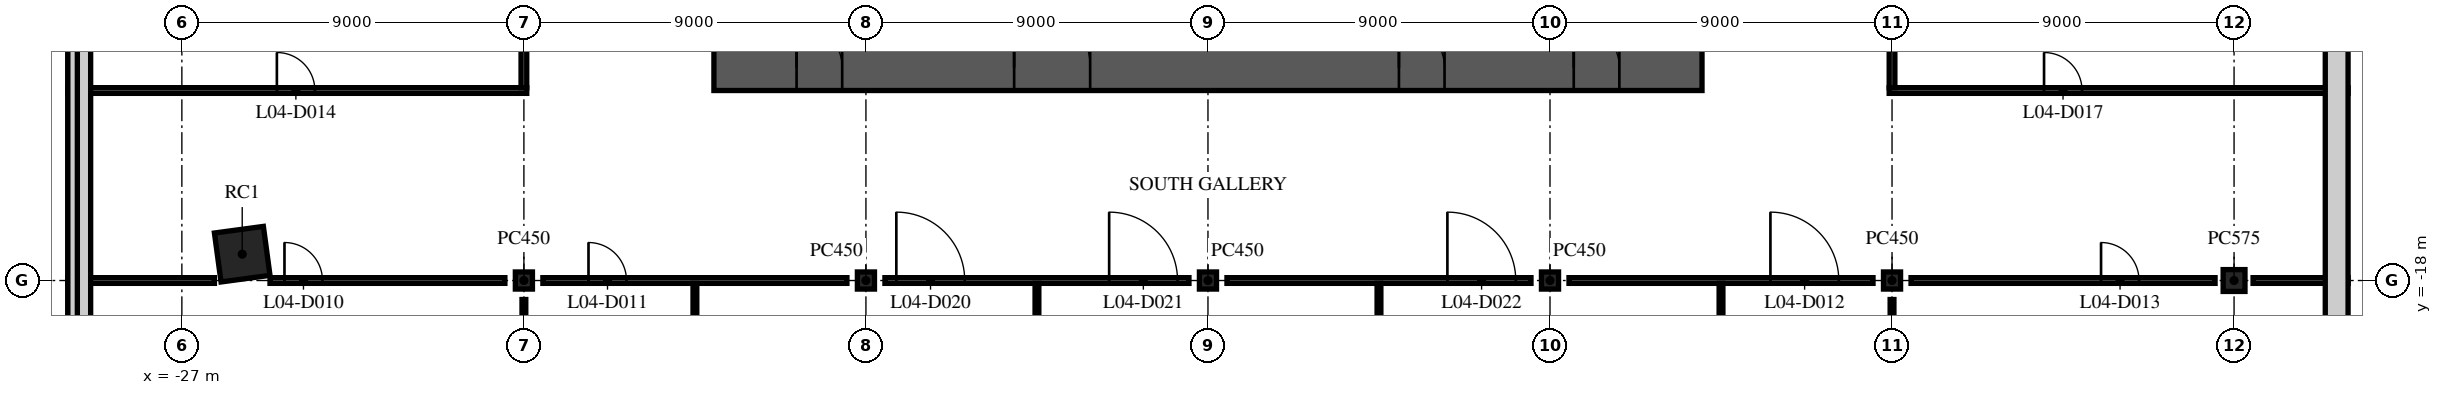
"""IFC4 building model, lengths in metres.
Left out: names, types, materials, properties, quantities, classifications, styles, units other than length and angle.
Written with IfcOpenShell. Run it as: python <this file> out.ifc"""

import sys

from ifc_helpers import new_model, si_unit, direction, frame, frame_2d, origin, origin_2d, place, context, subcontext, project, spatial, rectangle, extrude, element, fill, save


model = new_model("IFC4")
c1 = context("Model", 3, precision=1e-05, world=origin(), true_north=direction((0.0, 1.0)))
c2 = subcontext(c1, "Body", "Model", "MODEL_VIEW")
j1 = project(units=[si_unit("LENGTHUNIT", "METRE"), si_unit("PLANEANGLEUNIT", "RADIAN")], contexts=[c1])
p1 = place(None, origin())
s1 = spatial("IfcSite", under=j1, at=p1, CompositionType="ELEMENT")
p2 = place(p1, origin())
s2 = spatial("IfcBuilding", under=s1, at=p2, CompositionType="ELEMENT")
p3 = place(p2, frame((0.0, 0.0, 18.0)))
s3 = spatial("IfcBuildingStorey", under=s2, at=p3, CompositionType="ELEMENT", Elevation=18.0)
for number, where, z_axis, x_axis in (
    (1, (-18.0, -18.0, 0.0), (0.0, 0.0, 1.0), (1.0, 0.0, 0.0)),
    (2, (-9.0, -18.0, 0.0), (0.0, 0.0, 1.0), (1.0, 0.0, 0.0)),
    (3, (0.0, -18.0, 0.0), (0.0, 0.0, 1.0), (1.0, 0.0, 0.0)),
    (4, (9.0, -18.0, 0.0), (0.0, 0.0, 1.0), (1.0, 0.0, 0.0)),
    (5, (18.0, -18.0, 0.0), (0.0, 0.0, 1.0), (1.0, 0.0, 0.0)),
):
    element("IfcColumn", number, at=place(p3, frame(where, z_axis=z_axis, x_axis=x_axis)), inside=s3, PredefinedType="COLUMN", context=c2, shape_type="SweptSolid", body=[
        extrude(rectangle(XDim=0.45, YDim=0.45, at=origin_2d()), origin(), (0.0, 0.0, 1.0), 4.5),
    ])
p4 = place(p3, frame((27.0, -18.0, 0.0), z_axis=(0.0, 0.0, 1.0), x_axis=(1.0, 0.0, 0.0)))
e6 = element("IfcColumn", 6, at=p4, inside=s3, PredefinedType="COLUMN", context=c2, shape_type="SweptSolid", body=[
    extrude(rectangle(XDim=0.575, YDim=0.575, at=origin_2d()), origin(), (0.0, 0.0, 1.0), 4.5),
])
p5 = place(p3, frame((-25.412, -17.307, 0.0), z_axis=(0.0, 0.0, 1.0), x_axis=(0.991001197216, 0.133853005627, 0.0)))
e7 = element("IfcColumn", 7, at=p5, inside=s3, PredefinedType="COLUMN", context=c2, shape_type="SweptSolid", body=[
    extrude(rectangle(XDim=1.3, YDim=1.3, at=origin_2d()), origin(), (0.0, 0.0, 1.0), 4.5),
])
p6 = place(p3, frame((-13.0, -12.4, 0.0), z_axis=(0.0, 0.0, 1.0), x_axis=(1.0, 0.0, 0.0)))
e8 = element("IfcWall", 8, at=p6, inside=s3, PredefinedType="SHEAR", context=c2, shape_type="SweptSolid", body=[
    extrude(rectangle(XDim=26.0, YDim=1.2, at=frame_2d((13.0, 0.0))), origin(), (0.0, 0.0, 1.0), 4.05),
])
p7 = place(p6, frame((7.9, 0.0, 0.0)))
e9 = element("IfcOpeningElement", 9, at=p7, cuts=e8, PredefinedType="OPENING", context=c2, shape_type="SweptSolid", body=[
    extrude(rectangle(XDim=2.0, YDim=2.1, at=frame_2d((1.0, 1.05))), frame((0.0, 0.61, 0.0), z_axis=(0.0, -1.0, 0.0), x_axis=(1.0, 0.0, 0.0)), (0.0, 0.0, 1.0), 1.22),
])
p8 = place(p6, frame((18.025, 0.0, 0.0)))
e10 = element("IfcOpeningElement", 10, at=p8, cuts=e8, PredefinedType="OPENING", context=c2, shape_type="SweptSolid", body=[
    extrude(rectangle(XDim=1.2, YDim=2.1, at=frame_2d((0.6, 1.05))), frame((0.0, 0.61, 0.0), z_axis=(0.0, -1.0, 0.0), x_axis=(1.0, 0.0, 0.0)), (0.0, 0.0, 1.0), 1.22),
])
p9 = place(p6, frame((2.175, 0.0, 0.0)))
e11 = element("IfcOpeningElement", 11, at=p9, cuts=e8, PredefinedType="OPENING", context=c2, shape_type="SweptSolid", body=[
    extrude(rectangle(XDim=1.2, YDim=2.1, at=frame_2d((0.6, 1.05))), frame((0.0, 0.61, 0.0), z_axis=(0.0, -1.0, 0.0), x_axis=(1.0, 0.0, 0.0)), (0.0, 0.0, 1.0), 1.22),
])
p10 = place(p6, frame((22.625, 0.0, 0.0)))
e12 = element("IfcOpeningElement", 12, at=p10, cuts=e8, PredefinedType="OPENING", context=c2, shape_type="SweptSolid", body=[
    extrude(rectangle(XDim=1.2, YDim=2.1, at=frame_2d((0.6, 1.05))), frame((0.0, 0.61, 0.0), z_axis=(0.0, -1.0, 0.0), x_axis=(1.0, 0.0, 0.0)), (0.0, 0.0, 1.0), 1.22),
])
p11 = place(p3, frame((-30.0, -18.0, 0.0), z_axis=(0.0, 0.0, 1.0), x_axis=(1.0, 0.0, 0.0)))
e13 = element("IfcWall", 13, at=p11, inside=s3, PredefinedType="PARTITIONING", context=c2, shape_type="SweptSolid", body=[
    extrude(rectangle(XDim=3.857, YDim=0.15, at=frame_2d((1.928, 0.0))), origin(), (0.0, 0.0, 1.0), 4.05),
])
p12 = place(p3, frame((-24.681, -18.0, 0.0), z_axis=(0.0, 0.0, 1.0), x_axis=(1.0, 0.0, 0.0)))
e14 = element("IfcWall", 14, at=p12, inside=s3, PredefinedType="PARTITIONING", context=c2, shape_type="SweptSolid", body=[
    extrude(rectangle(XDim=6.181, YDim=0.15, at=frame_2d((3.09, 0.0))), origin(), (0.0, 0.0, 1.0), 3.53),
])
p13 = place(p12, frame((0.381, 0.0, 0.0)))
e15 = element("IfcOpeningElement", 15, at=p13, cuts=e14, PredefinedType="OPENING", context=c2, shape_type="SweptSolid", body=[
    extrude(rectangle(XDim=1.0, YDim=2.1, at=frame_2d((0.5, 1.05))), frame((0.0, 0.085, 0.0), z_axis=(0.0, -1.0, 0.0), x_axis=(1.0, 0.0, 0.0)), (0.0, 0.0, 1.0), 0.17),
])
p14 = place(p3, frame((-17.5, -18.0, 0.0), z_axis=(0.0, 0.0, 1.0), x_axis=(1.0, 0.0, 0.0)))
e16 = element("IfcWall", 16, at=p14, inside=s3, PredefinedType="PARTITIONING", context=c2, shape_type="SweptSolid", body=[
    extrude(rectangle(XDim=8.0, YDim=0.15, at=frame_2d((4.0, 0.0))), origin(), (0.0, 0.0, 1.0), 3.53),
])
p15 = place(p14, frame((1.2, 0.0, 0.0)))
e17 = element("IfcOpeningElement", 17, at=p15, cuts=e16, PredefinedType="OPENING", context=c2, shape_type="SweptSolid", body=[
    extrude(rectangle(XDim=1.0, YDim=2.1, at=frame_2d((0.5, 1.05))), frame((0.0, 0.085, 0.0), z_axis=(0.0, -1.0, 0.0), x_axis=(1.0, 0.0, 0.0)), (0.0, 0.0, 1.0), 0.17),
])
p16 = place(p3, frame((-8.5, -18.0, 0.0), z_axis=(0.0, 0.0, 1.0), x_axis=(1.0, 0.0, 0.0)))
e18 = element("IfcWall", 18, at=p16, inside=s3, PredefinedType="PARTITIONING", context=c2, shape_type="SweptSolid", body=[
    extrude(rectangle(XDim=8.0, YDim=0.15, at=frame_2d((4.0, 0.0))), origin(), (0.0, 0.0, 1.0), 3.53),
])
p17 = place(p16, frame((0.3, 0.0, 0.0)))
e19 = element("IfcOpeningElement", 19, at=p17, cuts=e18, PredefinedType="OPENING", context=c2, shape_type="SweptSolid", body=[
    extrude(rectangle(XDim=1.8, YDim=2.1, at=frame_2d((0.9, 1.05))), frame((0.0, 0.085, 0.0), z_axis=(0.0, -1.0, 0.0), x_axis=(1.0, 0.0, 0.0)), (0.0, 0.0, 1.0), 0.17),
])
p18 = place(p16, frame((5.9, 0.0, 0.0)))
e20 = element("IfcOpeningElement", 20, at=p18, cuts=e18, PredefinedType="OPENING", context=c2, shape_type="SweptSolid", body=[
    extrude(rectangle(XDim=1.8, YDim=2.1, at=frame_2d((0.9, 1.05))), frame((0.0, 0.085, 0.0), z_axis=(0.0, -1.0, 0.0), x_axis=(1.0, 0.0, 0.0)), (0.0, 0.0, 1.0), 0.17),
])
p19 = place(p3, frame((0.5, -18.0, 0.0), z_axis=(0.0, 0.0, 1.0), x_axis=(1.0, 0.0, 0.0)))
e21 = element("IfcWall", 21, at=p19, inside=s3, PredefinedType="PARTITIONING", context=c2, shape_type="SweptSolid", body=[
    extrude(rectangle(XDim=8.0, YDim=0.15, at=frame_2d((4.0, 0.0))), origin(), (0.0, 0.0, 1.0), 3.53),
])
p20 = place(p19, frame((5.8, 0.0, 0.0)))
e22 = element("IfcOpeningElement", 22, at=p20, cuts=e21, PredefinedType="OPENING", context=c2, shape_type="SweptSolid", body=[
    extrude(rectangle(XDim=1.8, YDim=2.1, at=frame_2d((0.9, 1.05))), frame((0.0, 0.085, 0.0), z_axis=(0.0, -1.0, 0.0), x_axis=(1.0, 0.0, 0.0)), (0.0, 0.0, 1.0), 0.17),
])
p21 = place(p3, frame((9.5, -18.0, 0.0), z_axis=(0.0, 0.0, 1.0), x_axis=(1.0, 0.0, 0.0)))
e23 = element("IfcWall", 23, at=p21, inside=s3, PredefinedType="PARTITIONING", context=c2, shape_type="SweptSolid", body=[
    extrude(rectangle(XDim=8.0, YDim=0.15, at=frame_2d((4.0, 0.0))), origin(), (0.0, 0.0, 1.0), 3.53),
])
p22 = place(p21, frame((5.3, 0.0, 0.0)))
e24 = element("IfcOpeningElement", 24, at=p22, cuts=e23, PredefinedType="OPENING", context=c2, shape_type="SweptSolid", body=[
    extrude(rectangle(XDim=1.8, YDim=2.1, at=frame_2d((0.9, 1.05))), frame((0.0, 0.085, 0.0), z_axis=(0.0, -1.0, 0.0), x_axis=(1.0, 0.0, 0.0)), (0.0, 0.0, 1.0), 0.17),
])
p23 = place(p3, frame((18.5, -18.0, 0.0), z_axis=(0.0, 0.0, 1.0), x_axis=(1.0, 0.0, 0.0)))
e25 = element("IfcWall", 25, at=p23, inside=s3, PredefinedType="PARTITIONING", context=c2, shape_type="SweptSolid", body=[
    extrude(rectangle(XDim=8.0, YDim=0.15, at=frame_2d((4.0, 0.0))), origin(), (0.0, 0.0, 1.0), 3.53),
])
p24 = place(p23, frame((5.0, 0.0, 0.0)))
e26 = element("IfcOpeningElement", 26, at=p24, cuts=e25, PredefinedType="OPENING", context=c2, shape_type="SweptSolid", body=[
    extrude(rectangle(XDim=1.0, YDim=2.1, at=frame_2d((0.5, 1.05))), frame((0.0, 0.085, 0.0), z_axis=(0.0, -1.0, 0.0), x_axis=(1.0, 0.0, 0.0)), (0.0, 0.0, 1.0), 0.17),
])
p25 = place(p3, frame((27.5, -18.0, 0.0), z_axis=(0.0, 0.0, 1.0), x_axis=(1.0, 0.0, 0.0)))
e27 = element("IfcWall", 27, at=p25, inside=s3, PredefinedType="PARTITIONING", context=c2, shape_type="SweptSolid", body=[
    extrude(rectangle(XDim=2.5, YDim=0.15, at=frame_2d((1.25, 0.0))), origin(), (0.0, 0.0, 1.0), 3.23),
])
p26 = place(p3, frame((-30.0, -13.0, 0.0), z_axis=(0.0, 0.0, 1.0), x_axis=(1.0, 0.0, 0.0)))
e28 = element("IfcWall", 28, at=p26, inside=s3, PredefinedType="PARTITIONING", context=c2, shape_type="SweptSolid", body=[
    extrude(rectangle(XDim=12.075, YDim=0.15, at=frame_2d((6.038, 0.0))), origin(), (0.0, 0.0, 1.0), 3.23),
])
p27 = place(p26, frame((5.5, 0.0, 0.0)))
e29 = element("IfcOpeningElement", 29, at=p27, cuts=e28, PredefinedType="OPENING", context=c2, shape_type="SweptSolid", body=[
    extrude(rectangle(XDim=1.0, YDim=2.1, at=frame_2d((0.5, 1.05))), frame((0.0, 0.085, 0.0), z_axis=(0.0, -1.0, 0.0), x_axis=(1.0, 0.0, 0.0)), (0.0, 0.0, 1.0), 0.17),
])
p28 = place(p3, frame((17.925, -13.0, 0.0), z_axis=(0.0, 0.0, 1.0), x_axis=(1.0, 0.0, 0.0)))
e30 = element("IfcWall", 30, at=p28, inside=s3, PredefinedType="PARTITIONING", context=c2, shape_type="SweptSolid", body=[
    extrude(rectangle(XDim=12.075, YDim=0.15, at=frame_2d((6.038, 0.0))), origin(), (0.0, 0.0, 1.0), 3.23),
])
p29 = place(p28, frame((4.075, 0.0, 0.0)))
e31 = element("IfcOpeningElement", 31, at=p29, cuts=e30, PredefinedType="OPENING", context=c2, shape_type="SweptSolid", body=[
    extrude(rectangle(XDim=1.0, YDim=2.1, at=frame_2d((0.5, 1.05))), frame((0.0, 0.085, 0.0), z_axis=(0.0, -1.0, 0.0), x_axis=(1.0, 0.0, 0.0)), (0.0, 0.0, 1.0), 0.17),
])
p30 = place(p3, frame((-18.0, -26.5, 0.0), z_axis=(0.0, 0.0, 1.0), x_axis=(0.0, 1.0, 0.0)))
e32 = element("IfcWall", 32, at=p30, inside=s3, PredefinedType="PARTITIONING", context=c2, shape_type="SweptSolid", body=[
    extrude(rectangle(XDim=8.0, YDim=0.1, at=frame_2d((4.0, 0.0))), origin(), (0.0, 0.0, 1.0), 3.53),
])
p31 = place(p3, frame((-18.0, -12.925, 0.0), z_axis=(0.0, 0.0, 1.0), x_axis=(0.0, 1.0, 0.0)))
e33 = element("IfcWall", 33, at=p31, inside=s3, PredefinedType="PARTITIONING", context=c2, shape_type="SweptSolid", body=[
    extrude(rectangle(XDim=3.425, YDim=0.15, at=frame_2d((1.712, 0.0))), origin(), (0.0, 0.0, 1.0), 3.53),
])
for number, where, z_axis, x_axis in (
    (34, (-13.5, -30.0, 0.0), (0.0, 0.0, 1.0), (0.0, 1.0, 0.0)),
    (35, (-4.5, -30.0, 0.0), (0.0, 0.0, 1.0), (0.0, 1.0, 0.0)),
    (36, (4.5, -30.0, 0.0), (0.0, 0.0, 1.0), (0.0, 1.0, 0.0)),
    (37, (13.5, -30.0, 0.0), (0.0, 0.0, 1.0), (0.0, 1.0, 0.0)),
):
    element("IfcWall", number, at=place(p3, frame(where, z_axis=z_axis, x_axis=x_axis)), inside=s3, PredefinedType="PARTITIONING", context=c2, shape_type="SweptSolid", body=[
        extrude(rectangle(XDim=11.925, YDim=0.1, at=frame_2d((5.962, 0.0))), origin(), (0.0, 0.0, 1.0), 3.23),
    ])
p32 = place(p3, frame((18.0, -24.681, 0.0), z_axis=(0.0, 0.0, 1.0), x_axis=(0.0, 1.0, 0.0)))
e38 = element("IfcWall", 38, at=p32, inside=s3, PredefinedType="PARTITIONING", context=c2, shape_type="SweptSolid", body=[
    extrude(rectangle(XDim=6.181, YDim=0.1, at=frame_2d((3.09, 0.0))), origin(), (0.0, 0.0, 1.0), 3.53),
])
p33 = place(p3, frame((18.0, -12.925, 0.0), z_axis=(0.0, 0.0, 1.0), x_axis=(0.0, 1.0, 0.0)))
e39 = element("IfcWall", 39, at=p33, inside=s3, PredefinedType="PARTITIONING", context=c2, shape_type="SweptSolid", body=[
    extrude(rectangle(XDim=3.425, YDim=0.15, at=frame_2d((1.712, 0.0))), origin(), (0.0, 0.0, 1.0), 3.53),
])
p34 = place(p3, frame((29.7, -29.4, 0.0), z_axis=(0.0, 0.0, 1.0), x_axis=(0.0, 1.0, 0.0)))
e40 = element("IfcWall", 40, at=p34, inside=s3, PredefinedType="STANDARD", context=c2, shape_type="SweptSolid", body=[
    extrude(rectangle(XDim=30.25, YDim=0.6, at=frame_2d((15.125, 0.0))), origin(), (0.0, 0.0, 1.0), 4.05),
])
p35 = place(p34, frame((0.908, 0.0, 0.9)))
e41 = element("IfcOpeningElement", 41, at=p35, cuts=e40, PredefinedType="OPENING", context=c2, shape_type="SweptSolid", body=[
    extrude(rectangle(XDim=2.2, YDim=3.0, at=frame_2d((1.1, 1.5))), frame((0.0, 0.31, 0.0), z_axis=(0.0, -1.0, 0.0), x_axis=(1.0, 0.0, 0.0)), (0.0, 0.0, 1.0), 0.62),
])
p36 = place(p34, frame((5.223, 0.0, 0.9)))
e42 = element("IfcOpeningElement", 42, at=p36, cuts=e40, PredefinedType="OPENING", context=c2, shape_type="SweptSolid", body=[
    extrude(rectangle(XDim=2.2, YDim=3.0, at=frame_2d((1.1, 1.5))), frame((0.0, 0.31, 0.0), z_axis=(0.0, -1.0, 0.0), x_axis=(1.0, 0.0, 0.0)), (0.0, 0.0, 1.0), 0.62),
])
p37 = place(p34, frame((23.685, 0.0, 0.9)))
e43 = element("IfcOpeningElement", 43, at=p37, cuts=e40, PredefinedType="OPENING", context=c2, shape_type="SweptSolid", body=[
    extrude(rectangle(XDim=2.2, YDim=3.0, at=frame_2d((1.1, 1.5))), frame((0.0, 0.31, 0.0), z_axis=(0.0, -1.0, 0.0), x_axis=(1.0, 0.0, 0.0)), (0.0, 0.0, 1.0), 0.62),
])
p38 = place(p3, frame((-29.7, -1.4, 0.0), z_axis=(0.0, 0.0, 1.0), x_axis=(0.0, -1.0, 0.0)))
e44 = element("IfcWall", 44, at=p38, inside=s3, PredefinedType="STANDARD", context=c2, shape_type="SweptSolid", body=[
    extrude(rectangle(XDim=28.6, YDim=0.6, at=frame_2d((14.3, 0.0))), origin(), (0.0, 0.0, 1.0), 4.05),
])
p39 = place(p38, frame((6.731, 0.0, 0.9)))
e45 = element("IfcOpeningElement", 45, at=p39, cuts=e44, PredefinedType="OPENING", context=c2, shape_type="SweptSolid", body=[
    extrude(rectangle(XDim=2.2, YDim=3.0, at=frame_2d((1.1, 1.5))), frame((0.0, 0.31, 0.0), z_axis=(0.0, -1.0, 0.0), x_axis=(1.0, 0.0, 0.0)), (0.0, 0.0, 1.0), 0.62),
])
p40 = place(p38, frame((20.577, 0.0, 0.9)))
e46 = element("IfcOpeningElement", 46, at=p40, cuts=e44, PredefinedType="OPENING", context=c2, shape_type="SweptSolid", body=[
    extrude(rectangle(XDim=2.2, YDim=3.0, at=frame_2d((1.1, 1.5))), frame((0.0, 0.31, 0.0), z_axis=(0.0, -1.0, 0.0), x_axis=(1.0, 0.0, 0.0)), (0.0, 0.0, 1.0), 0.62),
])
p41 = place(p38, frame((25.192, 0.0, 0.9)))
e47 = element("IfcOpeningElement", 47, at=p41, cuts=e44, PredefinedType="OPENING", context=c2, shape_type="SweptSolid", body=[
    extrude(rectangle(XDim=2.2, YDim=3.0, at=frame_2d((1.1, 1.5))), frame((0.0, 0.31, 0.0), z_axis=(0.0, -1.0, 0.0), x_axis=(1.0, 0.0, 0.0)), (0.0, 0.0, 1.0), 0.62),
])
p42 = place(p3, frame((-29.875, -7.453, 4.5), z_axis=(0.0, 0.0, 1.0), x_axis=(0.0, -1.0, 0.0)))
e48 = element("IfcWall", 48, at=p42, inside=s3, PredefinedType="PARAPET", context=c2, shape_type="SweptSolid", body=[
    extrude(rectangle(XDim=22.547, YDim=0.25, at=frame_2d((11.273, 0.0))), origin(), (0.0, 0.0, 1.0), 1.1),
])
p43 = place(p7, origin())
e49 = element("IfcDoor", 49, at=p43, inside=s3, OperationType="SINGLE_SWING_LEFT", PredefinedType="DOOR", context=c2, shape_type="SweptSolid", body=[
    extrude(rectangle(XDim=2.0, YDim=2.1, at=frame_2d((1.0, 1.05))), frame((0.0, 0.025, 0.0), z_axis=(0.0, -1.0, 0.0), x_axis=(1.0, 0.0, 0.0)), (0.0, 0.0, 1.0), 0.05),
])
fill(e9, e49)
p44 = place(p8, origin())
e50 = element("IfcDoor", 50, at=p44, inside=s3, OperationType="SINGLE_SWING_LEFT", PredefinedType="DOOR", context=c2, shape_type="SweptSolid", body=[
    extrude(rectangle(XDim=1.2, YDim=2.1, at=frame_2d((0.6, 1.05))), frame((0.0, 0.025, 0.0), z_axis=(0.0, -1.0, 0.0), x_axis=(1.0, 0.0, 0.0)), (0.0, 0.0, 1.0), 0.05),
])
fill(e10, e50)
p45 = place(p9, origin())
e51 = element("IfcDoor", 51, at=p45, inside=s3, OperationType="SINGLE_SWING_LEFT", PredefinedType="DOOR", context=c2, shape_type="SweptSolid", body=[
    extrude(rectangle(XDim=1.2, YDim=2.1, at=frame_2d((0.6, 1.05))), frame((0.0, 0.025, 0.0), z_axis=(0.0, -1.0, 0.0), x_axis=(1.0, 0.0, 0.0)), (0.0, 0.0, 1.0), 0.05),
])
fill(e11, e51)
p46 = place(p10, origin())
e52 = element("IfcDoor", 52, at=p46, inside=s3, OperationType="SINGLE_SWING_LEFT", PredefinedType="DOOR", context=c2, shape_type="SweptSolid", body=[
    extrude(rectangle(XDim=1.2, YDim=2.1, at=frame_2d((0.6, 1.05))), frame((0.0, 0.025, 0.0), z_axis=(0.0, -1.0, 0.0), x_axis=(1.0, 0.0, 0.0)), (0.0, 0.0, 1.0), 0.05),
])
fill(e12, e52)
p47 = place(p13, origin())
e53 = element("IfcDoor", 53, at=p47, inside=s3, OperationType="SINGLE_SWING_RIGHT", PredefinedType="DOOR", context=c2, shape_type="SweptSolid", body=[
    extrude(rectangle(XDim=1.0, YDim=2.1, at=frame_2d((0.5, 1.05))), frame((0.0, 0.025, 0.0), z_axis=(0.0, -1.0, 0.0), x_axis=(1.0, 0.0, 0.0)), (0.0, 0.0, 1.0), 0.05),
])
fill(e15, e53)
p48 = place(p15, origin())
e54 = element("IfcDoor", 54, at=p48, inside=s3, OperationType="SINGLE_SWING_LEFT", PredefinedType="DOOR", context=c2, shape_type="SweptSolid", body=[
    extrude(rectangle(XDim=1.0, YDim=2.1, at=frame_2d((0.5, 1.05))), frame((0.0, 0.025, 0.0), z_axis=(0.0, -1.0, 0.0), x_axis=(1.0, 0.0, 0.0)), (0.0, 0.0, 1.0), 0.05),
])
fill(e17, e54)
p49 = place(p22, origin())
e55 = element("IfcDoor", 55, at=p49, inside=s3, OperationType="DOUBLE_DOOR_SINGLE_SWING", PredefinedType="DOOR", context=c2, shape_type="SweptSolid", body=[
    extrude(rectangle(XDim=1.8, YDim=2.1, at=frame_2d((0.9, 1.05))), frame((0.0, 0.025, 0.0), z_axis=(0.0, -1.0, 0.0), x_axis=(1.0, 0.0, 0.0)), (0.0, 0.0, 1.0), 0.05),
])
fill(e24, e55)
p50 = place(p24, origin())
e56 = element("IfcDoor", 56, at=p50, inside=s3, OperationType="SINGLE_SWING_LEFT", PredefinedType="DOOR", context=c2, shape_type="SweptSolid", body=[
    extrude(rectangle(XDim=1.0, YDim=2.1, at=frame_2d((0.5, 1.05))), frame((0.0, 0.025, 0.0), z_axis=(0.0, -1.0, 0.0), x_axis=(1.0, 0.0, 0.0)), (0.0, 0.0, 1.0), 0.05),
])
fill(e26, e56)
p51 = place(p27, origin())
e57 = element("IfcDoor", 57, at=p51, inside=s3, OperationType="SINGLE_SWING_RIGHT", PredefinedType="DOOR", context=c2, shape_type="SweptSolid", body=[
    extrude(rectangle(XDim=1.0, YDim=2.1, at=frame_2d((0.5, 1.05))), frame((0.0, 0.025, 0.0), z_axis=(0.0, -1.0, 0.0), x_axis=(1.0, 0.0, 0.0)), (0.0, 0.0, 1.0), 0.05),
])
fill(e29, e57)
p52 = place(p29, origin())
e58 = element("IfcDoor", 58, at=p52, inside=s3, OperationType="SINGLE_SWING_LEFT", PredefinedType="DOOR", context=c2, shape_type="SweptSolid", body=[
    extrude(rectangle(XDim=1.0, YDim=2.1, at=frame_2d((0.5, 1.05))), frame((0.0, 0.025, 0.0), z_axis=(0.0, -1.0, 0.0), x_axis=(1.0, 0.0, 0.0)), (0.0, 0.0, 1.0), 0.05),
])
fill(e31, e58)
p53 = place(p17, origin())
e59 = element("IfcDoor", 59, at=p53, inside=s3, OperationType="DOUBLE_DOOR_SINGLE_SWING", PredefinedType="DOOR", context=c2, shape_type="SweptSolid", body=[
    extrude(rectangle(XDim=1.8, YDim=2.1, at=frame_2d((0.9, 1.05))), frame((0.0, 0.025, 0.0), z_axis=(0.0, -1.0, 0.0), x_axis=(1.0, 0.0, 0.0)), (0.0, 0.0, 1.0), 0.05),
])
fill(e19, e59)
p54 = place(p18, origin())
e60 = element("IfcDoor", 60, at=p54, inside=s3, OperationType="DOUBLE_DOOR_SINGLE_SWING", PredefinedType="DOOR", context=c2, shape_type="SweptSolid", body=[
    extrude(rectangle(XDim=1.8, YDim=2.1, at=frame_2d((0.9, 1.05))), frame((0.0, 0.025, 0.0), z_axis=(0.0, -1.0, 0.0), x_axis=(1.0, 0.0, 0.0)), (0.0, 0.0, 1.0), 0.05),
])
fill(e20, e60)
p55 = place(p20, origin())
e61 = element("IfcDoor", 61, at=p55, inside=s3, OperationType="DOUBLE_DOOR_SINGLE_SWING", PredefinedType="DOOR", context=c2, shape_type="SweptSolid", body=[
    extrude(rectangle(XDim=1.8, YDim=2.1, at=frame_2d((0.9, 1.05))), frame((0.0, 0.025, 0.0), z_axis=(0.0, -1.0, 0.0), x_axis=(1.0, 0.0, 0.0)), (0.0, 0.0, 1.0), 0.05),
])
fill(e22, e61)
save(model, sys.argv[1])
